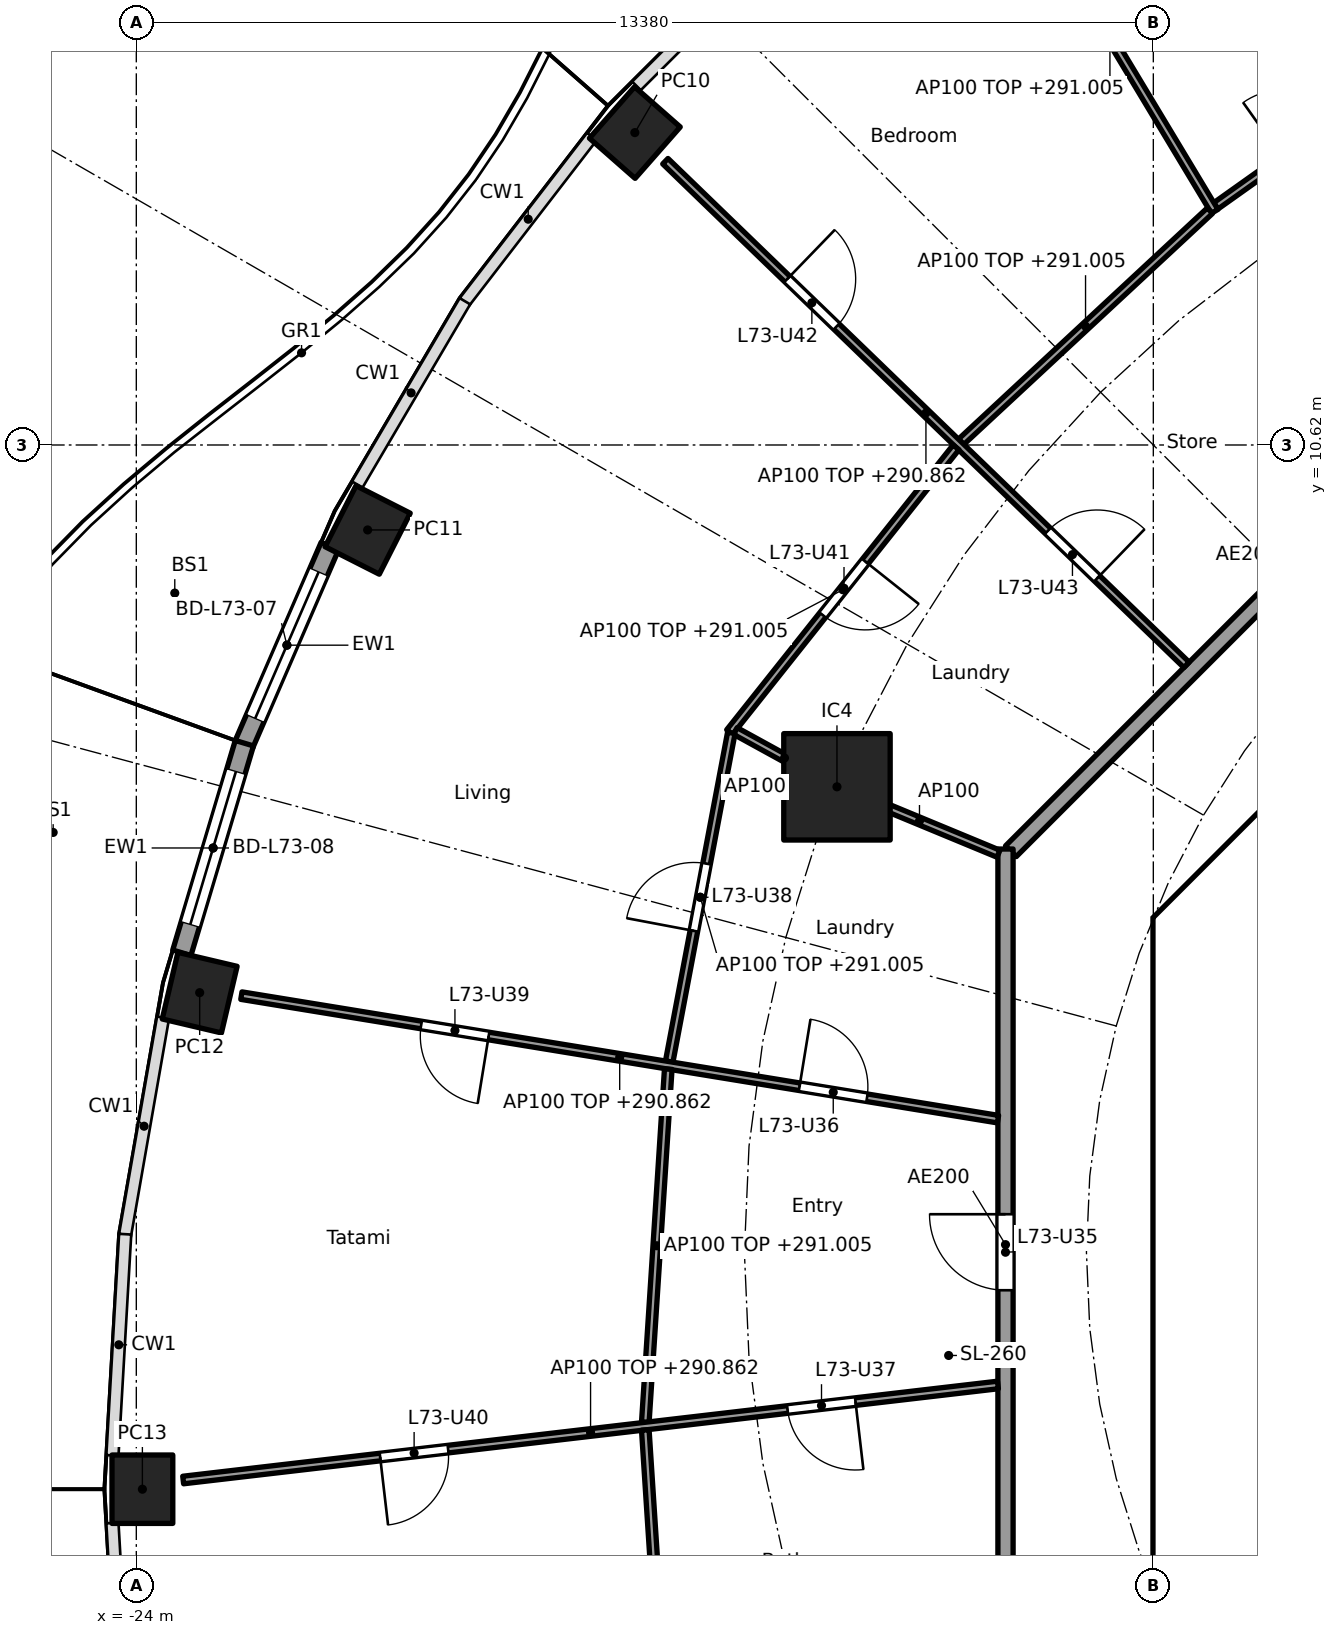
"""IFC4 building model, lengths in metres.
Left out: names, types, materials, properties, quantities, classifications, styles, units other than length and angle.
Written with IfcOpenShell. Run it as: python <this file> out.ifc"""

import sys

from ifc_helpers import new_model, si_unit, direction, frame, frame_2d, origin, origin_2d, place, context, subcontext, project, spatial, polyline, rectangle, hollow_rectangle, outline, extrude, element, fill, save


model = new_model("IFC4")
c1 = context("Model", 3, precision=1e-05, world=origin(), true_north=direction((0.0, 1.0)))
c2 = subcontext(c1, "Body", "Model", "MODEL_VIEW")
j1 = project(units=[si_unit("LENGTHUNIT", "METRE"), si_unit("PLANEANGLEUNIT", "RADIAN")], contexts=[c1])
p1 = place(None, origin())
s1 = spatial("IfcSite", under=j1, at=p1, CompositionType="ELEMENT")
p2 = place(p1, origin())
s2 = spatial("IfcBuilding", under=s1, at=p2, CompositionType="ELEMENT")
p3 = place(p2, frame((0.0, 0.0, 288.1)))
s3 = spatial("IfcBuildingStorey", under=s2, at=p3, CompositionType="ELEMENT", Elevation=288.1)
for number, where, z_axis, x_axis in (
    (1, (-17.441, 14.73, 0.0), (0.0, 0.0, 1.0), (-0.66, -0.751, 0.0)),
    (2, (-20.957, 9.502, 0.0), (0.0, 0.0, 1.0), (-0.452, -0.892, 0.0)),
    (3, (-23.166, 3.415, 0.0), (0.0, 0.0, 1.0), (-0.229, -0.973, 0.0)),
    (4, (-23.92, -3.118, 0.0), (0.0, 0.0, 1.0), (0.0, -1.0, 0.0)),
):
    element("IfcColumn", number, at=place(p3, frame(where, z_axis=z_axis, x_axis=x_axis)), inside=s3, PredefinedType="COLUMN", context=c2, shape_type="SweptSolid", body=[
        extrude(hollow_rectangle(XDim=0.9, YDim=0.8, WallThickness=0.028, at=origin_2d()), origin(), (0.0, 0.0, 1.0), 3.7),
    ])
p4 = place(p3, frame((-14.782, 6.123, 0.0), z_axis=(0.0, 0.0, 1.0), x_axis=(1.0, 0.0, 0.0)))
e5 = element("IfcColumn", 5, at=p4, inside=s3, PredefinedType="COLUMN", context=c2, shape_type="SweptSolid", body=[
    extrude(rectangle(XDim=1.4, YDim=1.4, at=origin_2d()), origin(), (0.0, 0.0, 1.0), 3.7),
])
p5 = place(p3, frame((-22.583, 6.683, 0.0), z_axis=(0.0, 0.0, 1.0), x_axis=(0.397597791596, 0.9175598052, 0.0)))
e6 = element("IfcWall", 6, at=p5, inside=s3, PredefinedType="SOLIDWALL", context=c2, shape_type="SweptSolid", body=[
    extrude(rectangle(XDim=2.841, YDim=0.25, at=frame_2d((1.42, 0.0))), origin(), (0.0, 0.0, 1.0), 3.44),
])
p6 = place(p5, frame((0.371, 0.0, 0.0)))
e7 = element("IfcOpeningElement", 7, at=p6, cuts=e6, PredefinedType="OPENING", context=c2, shape_type="SweptSolid", body=[
    extrude(rectangle(XDim=2.1, YDim=2.4, at=frame_2d((1.05, 1.2))), frame((0.0, 0.135, 0.0), z_axis=(0.0, -1.0, 0.0), x_axis=(1.0, 0.0, 0.0)), (0.0, 0.0, 1.0), 0.27),
])
p7 = place(p3, frame((-23.401, 3.94, 0.0), z_axis=(0.0, 0.0, 1.0), x_axis=(0.285876209024, 0.9582665564, 0.0)))
e8 = element("IfcWall", 8, at=p7, inside=s3, PredefinedType="SOLIDWALL", context=c2, shape_type="SweptSolid", body=[
    extrude(rectangle(XDim=2.877, YDim=0.25, at=frame_2d((1.438, 0.0))), origin(), (0.0, 0.0, 1.0), 3.44),
])
p8 = place(p7, frame((0.389, 0.0, 0.0)))
e9 = element("IfcOpeningElement", 9, at=p8, cuts=e8, PredefinedType="OPENING", context=c2, shape_type="SweptSolid", body=[
    extrude(rectangle(XDim=2.1, YDim=2.4, at=frame_2d((1.05, 1.2))), frame((0.0, 0.135, 0.0), z_axis=(0.0, -1.0, 0.0), x_axis=(1.0, 0.0, 0.0)), (0.0, 0.0, 1.0), 0.27),
])
p9 = place(p3, frame((-4.613, 9.988, 0.0), z_axis=(0.0, 0.0, 1.0), x_axis=(-0.707106781187, -0.707106781187, 0.0)))
e10 = element("IfcWall", 10, at=p9, inside=s3, PredefinedType="SHEAR", context=c2, shape_type="SweptSolid", body=[
    extrude(rectangle(XDim=7.602, YDim=0.6, at=frame_2d((3.801, 0.0))), origin(), (0.0, 0.0, 1.0), 3.44),
])
p10 = place(p9, frame((0.351, 0.0, 0.0)))
e11 = element("IfcOpeningElement", 11, at=p10, cuts=e10, PredefinedType="OPENING", context=c2, shape_type="SweptSolid", body=[
    extrude(rectangle(XDim=1.1, YDim=2.1, at=frame_2d((0.55, 1.05))), frame((0.0, 0.31, 0.0), z_axis=(0.0, -1.0, 0.0), x_axis=(1.0, 0.0, 0.0)), (0.0, 0.0, 1.0), 0.62),
])
p11 = place(p3, frame((-10.325, 3.801, 0.0), z_axis=(0.0, 0.0, 1.0), x_axis=(0.0, -1.0, 0.0)))
e12 = element("IfcWall", 12, at=p11, inside=s3, PredefinedType="SHEAR", context=c2, shape_type="SweptSolid", body=[
    extrude(rectangle(XDim=7.602, YDim=0.6, at=frame_2d((3.801, 0.0))), origin(), (0.0, 0.0, 1.0), 3.44),
])
p12 = place(p11, frame((0.651, 0.0, 0.0)))
e13 = element("IfcOpeningElement", 13, at=p12, cuts=e12, PredefinedType="OPENING", context=c2, shape_type="SweptSolid", body=[
    extrude(rectangle(XDim=1.5, YDim=2.1, at=frame_2d((0.75, 1.05))), frame((0.0, 0.31, 0.0), z_axis=(0.0, -1.0, 0.0), x_axis=(1.0, 0.0, 0.0)), (0.0, 0.0, 1.0), 0.62),
])
p13 = place(p11, frame((5.451, 0.0, 0.0)))
e14 = element("IfcOpeningElement", 14, at=p13, cuts=e12, PredefinedType="OPENING", context=c2, shape_type="SweptSolid", body=[
    extrude(rectangle(XDim=1.5, YDim=2.1, at=frame_2d((0.75, 1.05))), frame((0.0, 0.31, 0.0), z_axis=(0.0, -1.0, 0.0), x_axis=(1.0, 0.0, 0.0)), (0.0, 0.0, 1.0), 0.62),
])
p14 = place(p3, origin())
e15 = element("IfcWall", 15, at=p14, inside=s3, PredefinedType="SHEAR", context=c2, shape_type="SweptSolid", body=[
    extrude(outline(polyline([(-10.625, -3.801), (-10.025, -3.801), (-10.025, -4.152), (-9.776, -4.401), (-10.2, -4.825), (-10.625, -4.401), (-10.625, -3.801)])), origin(), (0.0, 0.0, 1.0), 3.44),
])
p15 = place(p3, origin())
e16 = element("IfcWall", 16, at=p15, inside=s3, PredefinedType="SHEAR", context=c2, shape_type="SweptSolid", body=[
    extrude(outline(polyline([(-10.2, 4.825), (-9.776, 4.401), (-10.025, 4.152), (-10.025, 3.801), (-10.625, 3.801), (-10.625, 4.401), (-10.2, 4.825)])), origin(), (0.0, 0.0, 1.0), 3.44),
])
for number, where, z_axis, x_axis in (
    (17, (-10.025, -4.0, 0.0), (0.0, 0.0, 1.0), (1.0, 0.0, 0.0)),
    (18, (-10.025, 4.0, 0.0), (0.0, 0.0, 1.0), (1.0, 0.0, 0.0)),
):
    element("IfcWall", number, at=place(p3, frame(where, z_axis=z_axis, x_axis=x_axis)), inside=s3, PredefinedType="PARTITIONING", context=c2, shape_type="SweptSolid", body=[
        extrude(rectangle(XDim=3.325, YDim=0.2, at=frame_2d((1.662, 0.0))), origin(), (0.0, 0.0, 1.0), 3.44),
    ])
p16 = place(p3, frame((-5.275, 12.494, 0.0), z_axis=(0.0, 0.0, 1.0), x_axis=(-0.707106781187, -0.707106781187, 0.0)))
e19 = element("IfcWall", 19, at=p16, inside=s3, PredefinedType="PARTITIONING", context=c2, shape_type="SweptSolid", body=[
    extrude(rectangle(XDim=10.209, YDim=0.2, at=frame_2d((5.104, 0.0))), origin(), (0.0, 0.0, 1.0), 3.44),
])
p17 = place(p3, frame((-12.565, 5.304, 0.0), z_axis=(0.0, 0.0, 1.0), x_axis=(0.0, -1.0, 0.0)))
e20 = element("IfcWall", 20, at=p17, inside=s3, PredefinedType="PARTITIONING", context=c2, shape_type="SweptSolid", body=[
    extrude(rectangle(XDim=10.409, YDim=0.2, at=frame_2d((5.205, 0.0))), origin(), (0.0, 0.0, 1.0), 3.44),
])
p18 = place(p17, frame((4.804, 0.0, 0.0)))
e21 = element("IfcOpeningElement", 21, at=p18, cuts=e20, PredefinedType="OPENING", context=c2, shape_type="SweptSolid", body=[
    extrude(rectangle(XDim=1.0, YDim=2.1, at=frame_2d((0.5, 1.05))), frame((0.0, 0.11, 0.0), z_axis=(0.0, -1.0, 0.0), x_axis=(1.0, 0.0, 0.0)), (0.0, 0.0, 1.0), 0.22),
])
p19 = place(p3, frame((-6.508, 16.103, 0.0), z_axis=(0.0, 0.0, 1.0), x_axis=(-0.815202203556, -0.579176456114, 0.0)))
e22 = element("IfcWall", 22, at=p19, inside=s3, PredefinedType="PARTITIONING", context=c2, shape_type="SweptSolid", body=[
    extrude(rectangle(XDim=4.036, YDim=0.1, at=frame_2d((2.018, 0.0))), origin(), (0.0, 0.0, 1.0), 2.905),
])
p20 = place(p19, frame((2.055, 0.0, 0.0)))
e23 = element("IfcOpeningElement", 23, at=p20, cuts=e22, PredefinedType="OPENING", context=c2, shape_type="SweptSolid", body=[
    extrude(rectangle(XDim=0.9, YDim=2.1, at=frame_2d((0.45, 1.05))), frame((0.0, 0.06, 0.0), z_axis=(0.0, -1.0, 0.0), x_axis=(1.0, 0.0, 0.0)), (0.0, 0.0, 1.0), 0.12),
])
p21 = place(p3, frame((-9.813, 13.693, 0.0), z_axis=(0.0, 0.0, 1.0), x_axis=(-0.515509511815, 0.856883856324, 0.0)))
e24 = element("IfcWall", 24, at=p21, inside=s3, PredefinedType="PARTITIONING", context=c2, shape_type="SweptSolid", body=[
    extrude(rectangle(XDim=5.346, YDim=0.1, at=frame_2d((2.673, 0.0))), origin(), (0.0, 0.0, 1.0), 2.905),
])
p22 = place(p3, frame((-9.875, 13.702, 0.0), z_axis=(0.0, 0.0, 1.0), x_axis=(-0.732618266441, -0.680639754699, 0.0)))
e25 = element("IfcWall", 25, at=p22, inside=s3, PredefinedType="PARTITIONING", context=c2, shape_type="SweptSolid", body=[
    extrude(rectangle(XDim=4.467, YDim=0.1, at=frame_2d((2.233, 0.0))), origin(), (0.0, 0.0, 1.0), 2.905),
])
p23 = place(p3, frame((-10.183, 7.727, 0.0), z_axis=(0.0, 0.0, 1.0), x_axis=(-0.719063433856, 0.694944442449, 0.0)))
e26 = element("IfcWall", 26, at=p23, inside=s3, PredefinedType="PARTITIONING", context=c2, shape_type="SweptSolid", body=[
    extrude(rectangle(XDim=9.535, YDim=0.1, at=frame_2d((4.768, 0.0))), origin(), (0.0, 0.0, 1.0), 2.762),
])
p24 = place(p23, frame((6.405, 0.0, 0.0)))
e27 = element("IfcOpeningElement", 27, at=p24, cuts=e26, PredefinedType="OPENING", context=c2, shape_type="SweptSolid", body=[
    extrude(rectangle(XDim=0.9, YDim=2.1, at=frame_2d((0.45, 1.05))), frame((0.0, 0.06, 0.0), z_axis=(0.0, -1.0, 0.0), x_axis=(1.0, 0.0, 0.0)), (0.0, 0.0, 1.0), 0.12),
])
p25 = place(p23, frame((1.637, 0.0, 0.0)))
e28 = element("IfcOpeningElement", 28, at=p25, cuts=e26, PredefinedType="OPENING", context=c2, shape_type="SweptSolid", body=[
    extrude(rectangle(XDim=0.9, YDim=2.1, at=frame_2d((0.45, 1.05))), frame((0.0, 0.06, 0.0), z_axis=(0.0, -1.0, 0.0), x_axis=(1.0, 0.0, 0.0)), (0.0, 0.0, 1.0), 0.12),
])
p26 = place(p3, frame((-13.216, 10.589, 0.0), z_axis=(0.0, 0.0, 1.0), x_axis=(-0.622272178674, -0.782800955319, 0.0)))
e29 = element("IfcWall", 29, at=p26, inside=s3, PredefinedType="PARTITIONING", context=c2, shape_type="SweptSolid", body=[
    extrude(rectangle(XDim=4.786, YDim=0.1, at=frame_2d((2.393, 0.0))), origin(), (0.0, 0.0, 1.0), 2.905),
])
p27 = place(p26, frame((1.918, 0.0, 0.0)))
e30 = element("IfcOpeningElement", 30, at=p27, cuts=e29, PredefinedType="OPENING", context=c2, shape_type="SweptSolid", body=[
    extrude(rectangle(XDim=0.9, YDim=2.1, at=frame_2d((0.45, 1.05))), frame((0.0, 0.06, 0.0), z_axis=(0.0, -1.0, 0.0), x_axis=(1.0, 0.0, 0.0)), (0.0, 0.0, 1.0), 0.12),
])
p28 = place(p3, frame((-12.657, 5.243, 0.0), z_axis=(0.0, 0.0, 1.0), x_axis=(-0.923864733477, 0.382719158442, 0.0)))
e31 = element("IfcWall", 31, at=p28, inside=s3, PredefinedType="PARTITIONING", context=c2, shape_type="SweptSolid", body=[
    extrude(rectangle(XDim=2.25, YDim=0.1, at=frame_2d((1.125, 0.0))), origin(), (0.0, 0.0, 1.0), 3.44),
])
p29 = place(p3, frame((-14.826, 6.147, 0.0), z_axis=(0.0, 0.0, 1.0), x_axis=(-0.876411496923, 0.481562963755, 0.0)))
e32 = element("IfcWall", 32, at=p29, inside=s3, PredefinedType="PARTITIONING", context=c2, shape_type="SweptSolid", body=[
    extrude(rectangle(XDim=1.475, YDim=0.1, at=frame_2d((0.738, 0.0))), origin(), (0.0, 0.0, 1.0), 3.44),
])
p30 = place(p3, frame((-16.172, 6.832, 0.0), z_axis=(0.0, 0.0, 1.0), x_axis=(-0.185671645069, -0.982611846162, 0.0)))
e33 = element("IfcWall", 33, at=p30, inside=s3, PredefinedType="PARTITIONING", context=c2, shape_type="SweptSolid", body=[
    extrude(rectangle(XDim=4.401, YDim=0.1, at=frame_2d((2.2, 0.0))), origin(), (0.0, 0.0, 1.0), 2.905),
])
p31 = place(p30, frame((1.75, 0.0, 0.0)))
e34 = element("IfcOpeningElement", 34, at=p31, cuts=e33, PredefinedType="OPENING", context=c2, shape_type="SweptSolid", body=[
    extrude(rectangle(XDim=0.9, YDim=2.1, at=frame_2d((0.45, 1.05))), frame((0.0, 0.06, 0.0), z_axis=(0.0, -1.0, 0.0), x_axis=(1.0, 0.0, 0.0)), (0.0, 0.0, 1.0), 0.12),
])
p32 = place(p3, frame((-12.664, 1.751, 0.0), z_axis=(0.0, 0.0, 1.0), x_axis=(-0.986935394566, 0.161116501183, 0.0)))
e35 = element("IfcWall", 35, at=p32, inside=s3, PredefinedType="PARTITIONING", context=c2, shape_type="SweptSolid", body=[
    extrude(rectangle(XDim=10.086, YDim=0.1, at=frame_2d((5.043, 0.0))), origin(), (0.0, 0.0, 1.0), 2.762),
])
p33 = place(p32, frame((1.746, 0.0, 0.0)))
e36 = element("IfcOpeningElement", 36, at=p33, cuts=e35, PredefinedType="OPENING", context=c2, shape_type="SweptSolid", body=[
    extrude(rectangle(XDim=0.9, YDim=2.1, at=frame_2d((0.45, 1.05))), frame((0.0, 0.06, 0.0), z_axis=(0.0, -1.0, 0.0), x_axis=(1.0, 0.0, 0.0)), (0.0, 0.0, 1.0), 0.12),
])
p34 = place(p32, frame((6.789, 0.0, 0.0)))
e37 = element("IfcOpeningElement", 37, at=p34, cuts=e35, PredefinedType="OPENING", context=c2, shape_type="SweptSolid", body=[
    extrude(rectangle(XDim=0.9, YDim=2.1, at=frame_2d((0.45, 1.05))), frame((0.0, 0.06, 0.0), z_axis=(0.0, -1.0, 0.0), x_axis=(1.0, 0.0, 0.0)), (0.0, 0.0, 1.0), 0.12),
])
p35 = place(p3, frame((-17.002, 2.409, 0.0), z_axis=(0.0, 0.0, 1.0), x_axis=(-0.064855550758, -0.997894662545, 0.0)))
e38 = element("IfcWall", 38, at=p35, inside=s3, PredefinedType="PARTITIONING", context=c2, shape_type="SweptSolid", body=[
    extrude(rectangle(XDim=4.656, YDim=0.1, at=frame_2d((2.328, 0.0))), origin(), (0.0, 0.0, 1.0), 2.905),
])
p36 = place(p3, frame((-12.664, -1.746, 0.0), z_axis=(0.0, 0.0, 1.0), x_axis=(-0.993264397529, -0.115869912409, 0.0)))
e39 = element("IfcWall", 39, at=p36, inside=s3, PredefinedType="PARTITIONING", context=c2, shape_type="SweptSolid", body=[
    extrude(rectangle(XDim=10.792, YDim=0.1, at=frame_2d((5.396, 0.0))), origin(), (0.0, 0.0, 1.0), 2.762),
])
p37 = place(p36, frame((1.887, 0.0, 0.0)))
e40 = element("IfcOpeningElement", 40, at=p37, cuts=e39, PredefinedType="OPENING", context=c2, shape_type="SweptSolid", body=[
    extrude(rectangle(XDim=0.9, YDim=2.1, at=frame_2d((0.45, 1.05))), frame((0.0, 0.06, 0.0), z_axis=(0.0, -1.0, 0.0), x_axis=(1.0, 0.0, 0.0)), (0.0, 0.0, 1.0), 0.12),
])
p38 = place(p36, frame((7.283, 0.0, 0.0)))
e41 = element("IfcOpeningElement", 41, at=p38, cuts=e39, PredefinedType="OPENING", context=c2, shape_type="SweptSolid", body=[
    extrude(rectangle(XDim=0.9, YDim=2.1, at=frame_2d((0.45, 1.05))), frame((0.0, 0.06, 0.0), z_axis=(0.0, -1.0, 0.0), x_axis=(1.0, 0.0, 0.0)), (0.0, 0.0, 1.0), 0.12),
])
p39 = place(p3, frame((-17.304, -2.338, 0.0), z_axis=(0.0, 0.0, 1.0), x_axis=(0.06500001157, -0.997885263192, 0.0)))
e42 = element("IfcWall", 42, at=p39, inside=s3, PredefinedType="PARTITIONING", context=c2, shape_type="SweptSolid", body=[
    extrude(rectangle(XDim=4.609, YDim=0.1, at=frame_2d((2.304, 0.0))), origin(), (0.0, 0.0, 1.0), 2.905),
])
p40 = place(p6, origin())
e43 = element("IfcDoor", 43, at=p40, inside=s3, OperationType="SLIDING_TO_LEFT", PredefinedType="DOOR", context=c2, shape_type="SweptSolid", body=[
    extrude(rectangle(XDim=2.1, YDim=2.4, at=frame_2d((1.05, 1.2))), frame((0.0, 0.025, 0.0), z_axis=(0.0, -1.0, 0.0), x_axis=(1.0, 0.0, 0.0)), (0.0, 0.0, 1.0), 0.05),
])
fill(e7, e43)
p41 = place(p8, origin())
e44 = element("IfcDoor", 44, at=p41, inside=s3, OperationType="SLIDING_TO_LEFT", PredefinedType="DOOR", context=c2, shape_type="SweptSolid", body=[
    extrude(rectangle(XDim=2.1, YDim=2.4, at=frame_2d((1.05, 1.2))), frame((0.0, 0.025, 0.0), z_axis=(0.0, -1.0, 0.0), x_axis=(1.0, 0.0, 0.0)), (0.0, 0.0, 1.0), 0.05),
])
fill(e9, e44)
p42 = place(p12, origin())
e45 = element("IfcDoor", 45, at=p42, inside=s3, OperationType="DOUBLE_DOOR_SINGLE_SWING", PredefinedType="DOOR", context=c2, shape_type="SweptSolid", body=[
    extrude(rectangle(XDim=1.5, YDim=2.1, at=frame_2d((0.75, 1.05))), frame((0.0, 0.025, 0.0), z_axis=(0.0, -1.0, 0.0), x_axis=(1.0, 0.0, 0.0)), (0.0, 0.0, 1.0), 0.05),
])
fill(e13, e45)
p43 = place(p13, origin())
e46 = element("IfcDoor", 46, at=p43, inside=s3, OperationType="DOUBLE_DOOR_SINGLE_SWING", PredefinedType="DOOR", context=c2, shape_type="SweptSolid", body=[
    extrude(rectangle(XDim=1.5, YDim=2.1, at=frame_2d((0.75, 1.05))), frame((0.0, 0.025, 0.0), z_axis=(0.0, -1.0, 0.0), x_axis=(1.0, 0.0, 0.0)), (0.0, 0.0, 1.0), 0.05),
])
fill(e14, e46)
p44 = place(p18, frame((1.0, 0.0, 0.0), x_axis=(-1.0, 0.0, 0.0)))
e47 = element("IfcDoor", 47, at=p44, inside=s3, OperationType="SINGLE_SWING_RIGHT", PredefinedType="DOOR", context=c2, shape_type="SweptSolid", body=[
    extrude(rectangle(XDim=1.0, YDim=2.1, at=frame_2d((0.5, 1.05))), frame((0.0, 0.025, 0.0), z_axis=(0.0, -1.0, 0.0), x_axis=(1.0, 0.0, 0.0)), (0.0, 0.0, 1.0), 0.05),
])
fill(e21, e47)
p45 = place(p33, frame((0.9, 0.0, 0.0), x_axis=(-1.0, 0.0, 0.0)))
e48 = element("IfcDoor", 48, at=p45, inside=s3, OperationType="SINGLE_SWING_LEFT", PredefinedType="DOOR", context=c2, shape_type="SweptSolid", body=[
    extrude(rectangle(XDim=0.9, YDim=2.1, at=frame_2d((0.45, 1.05))), frame((0.0, 0.025, 0.0), z_axis=(0.0, -1.0, 0.0), x_axis=(1.0, 0.0, 0.0)), (0.0, 0.0, 1.0), 0.05),
])
fill(e36, e48)
p46 = place(p37, origin())
e49 = element("IfcDoor", 49, at=p46, inside=s3, OperationType="SINGLE_SWING_LEFT", PredefinedType="DOOR", context=c2, shape_type="SweptSolid", body=[
    extrude(rectangle(XDim=0.9, YDim=2.1, at=frame_2d((0.45, 1.05))), frame((0.0, 0.025, 0.0), z_axis=(0.0, -1.0, 0.0), x_axis=(1.0, 0.0, 0.0)), (0.0, 0.0, 1.0), 0.05),
])
fill(e40, e49)
p47 = place(p31, frame((0.9, 0.0, 0.0), x_axis=(-1.0, 0.0, 0.0)))
e50 = element("IfcDoor", 50, at=p47, inside=s3, OperationType="SINGLE_SWING_LEFT", PredefinedType="DOOR", context=c2, shape_type="SweptSolid", body=[
    extrude(rectangle(XDim=0.9, YDim=2.1, at=frame_2d((0.45, 1.05))), frame((0.0, 0.025, 0.0), z_axis=(0.0, -1.0, 0.0), x_axis=(1.0, 0.0, 0.0)), (0.0, 0.0, 1.0), 0.05),
])
fill(e34, e50)
p48 = place(p34, origin())
e51 = element("IfcDoor", 51, at=p48, inside=s3, OperationType="SINGLE_SWING_LEFT", PredefinedType="DOOR", context=c2, shape_type="SweptSolid", body=[
    extrude(rectangle(XDim=0.9, YDim=2.1, at=frame_2d((0.45, 1.05))), frame((0.0, 0.025, 0.0), z_axis=(0.0, -1.0, 0.0), x_axis=(1.0, 0.0, 0.0)), (0.0, 0.0, 1.0), 0.05),
])
fill(e37, e51)
p49 = place(p38, origin())
e52 = element("IfcDoor", 52, at=p49, inside=s3, OperationType="SINGLE_SWING_RIGHT", PredefinedType="DOOR", context=c2, shape_type="SweptSolid", body=[
    extrude(rectangle(XDim=0.9, YDim=2.1, at=frame_2d((0.45, 1.05))), frame((0.0, 0.025, 0.0), z_axis=(0.0, -1.0, 0.0), x_axis=(1.0, 0.0, 0.0)), (0.0, 0.0, 1.0), 0.05),
])
fill(e41, e52)
p50 = place(p27, origin())
e53 = element("IfcDoor", 53, at=p50, inside=s3, OperationType="SINGLE_SWING_LEFT", PredefinedType="DOOR", context=c2, shape_type="SweptSolid", body=[
    extrude(rectangle(XDim=0.9, YDim=2.1, at=frame_2d((0.45, 1.05))), frame((0.0, 0.025, 0.0), z_axis=(0.0, -1.0, 0.0), x_axis=(1.0, 0.0, 0.0)), (0.0, 0.0, 1.0), 0.05),
])
fill(e30, e53)
p51 = place(p24, frame((0.9, 0.0, 0.0), x_axis=(-1.0, 0.0, 0.0)))
e54 = element("IfcDoor", 54, at=p51, inside=s3, OperationType="SINGLE_SWING_LEFT", PredefinedType="DOOR", context=c2, shape_type="SweptSolid", body=[
    extrude(rectangle(XDim=0.9, YDim=2.1, at=frame_2d((0.45, 1.05))), frame((0.0, 0.025, 0.0), z_axis=(0.0, -1.0, 0.0), x_axis=(1.0, 0.0, 0.0)), (0.0, 0.0, 1.0), 0.05),
])
fill(e27, e54)
p52 = place(p25, frame((0.9, 0.0, 0.0), x_axis=(-1.0, 0.0, 0.0)))
e55 = element("IfcDoor", 55, at=p52, inside=s3, OperationType="SINGLE_SWING_RIGHT", PredefinedType="DOOR", context=c2, shape_type="SweptSolid", body=[
    extrude(rectangle(XDim=0.9, YDim=2.1, at=frame_2d((0.45, 1.05))), frame((0.0, 0.025, 0.0), z_axis=(0.0, -1.0, 0.0), x_axis=(1.0, 0.0, 0.0)), (0.0, 0.0, 1.0), 0.05),
])
fill(e28, e55)
save(model, sys.argv[1])
